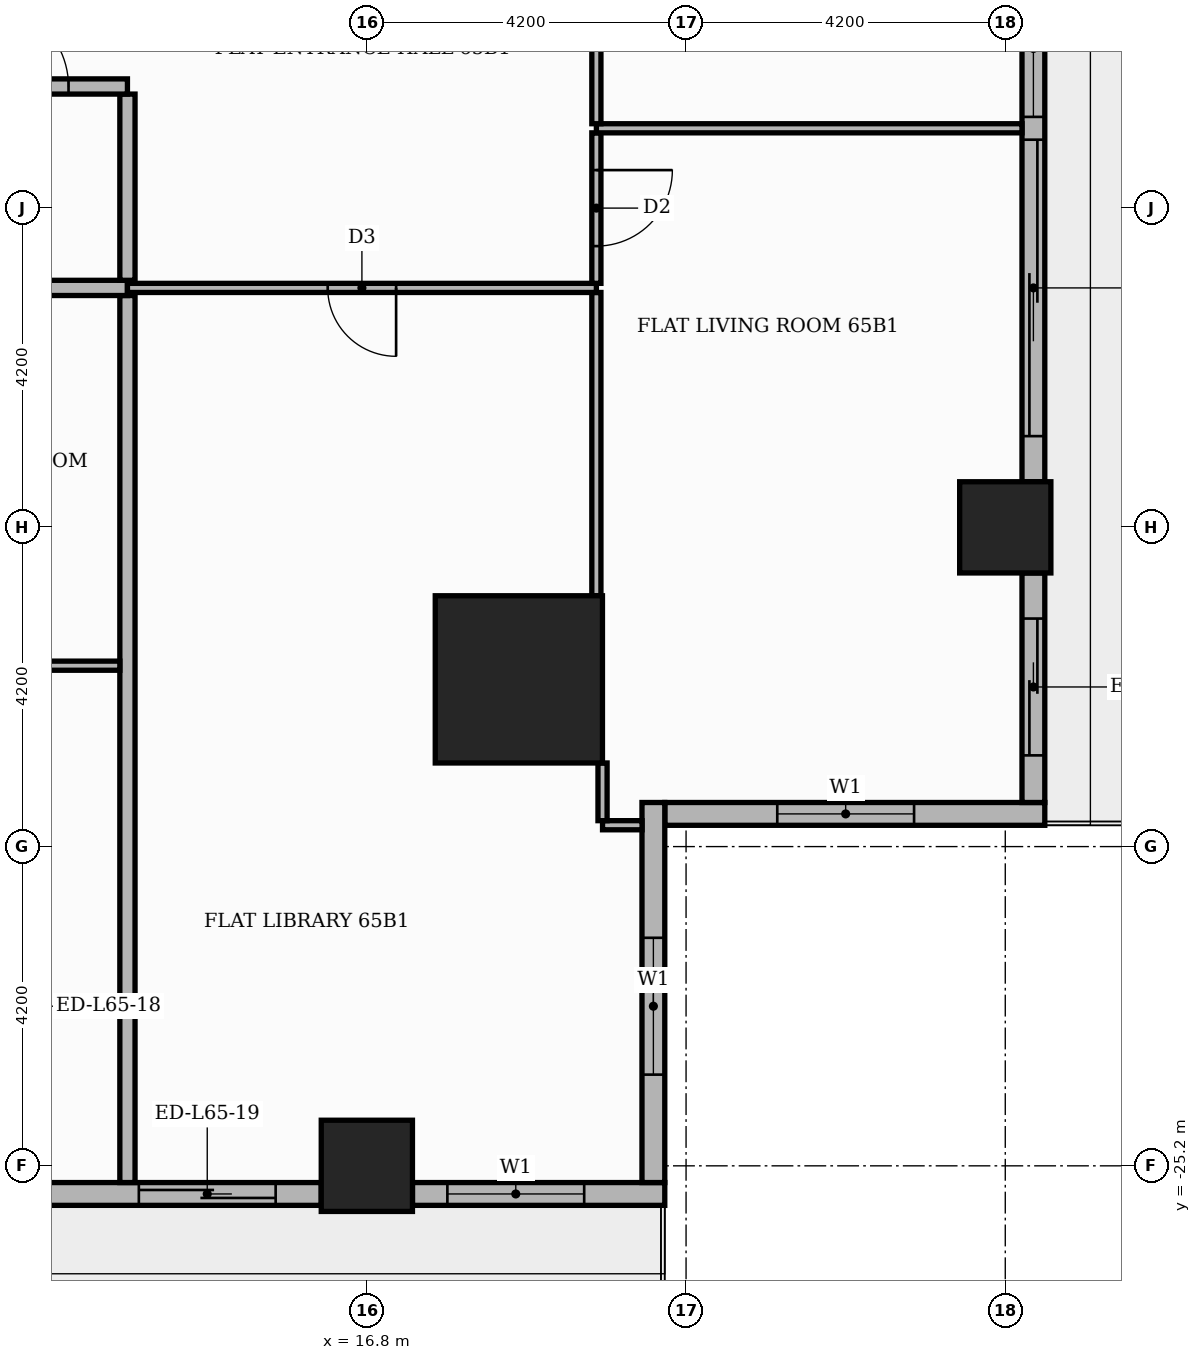
"""IFC4 building model, lengths in metres.
Left out: names, types, materials, properties, quantities, classifications, styles, units other than length and angle.
Written with IfcOpenShell. Run it as: python <this file> out.ifc"""

import sys

from ifc_helpers import new_model, si_unit, direction, frame, frame_2d, origin, origin_2d, place, context, subcontext, project, spatial, rectangle, extrude, element, fill, save


model = new_model("IFC4")
c1 = context("Model", 3, precision=1e-05, world=origin(), true_north=direction((0.0, 1.0)))
c2 = subcontext(c1, "Body", "Model", "MODEL_VIEW")
j1 = project(units=[si_unit("LENGTHUNIT", "METRE"), si_unit("PLANEANGLEUNIT", "RADIAN")], contexts=[c1])
p1 = place(None, origin())
s1 = spatial("IfcSite", under=j1, at=p1, CompositionType="ELEMENT")
p2 = place(p1, origin())
s2 = spatial("IfcBuilding", under=s1, at=p2, CompositionType="ELEMENT")
p3 = place(p2, frame((0.0, 0.0, 271.8)))
s3 = spatial("IfcBuildingStorey", under=s2, at=p3, CompositionType="ELEMENT", Elevation=271.8)
p4 = place(p3, frame((18.8, -18.8, 0.0), z_axis=(0.0, 0.0, 1.0), x_axis=(1.0, 0.0, 0.0)))
e1 = element("IfcColumn", 1, at=p4, inside=s3, PredefinedType="COLUMN", context=c2, shape_type="SweptSolid", body=[
    extrude(rectangle(XDim=2.2, YDim=2.2, at=origin_2d()), origin(), (0.0, 0.0, 1.0), 3.9),
])
for number, where, z_axis, x_axis in (
    (2, (25.2, -16.8, 0.0), (0.0, 0.0, 1.0), (1.0, 0.0, 0.0)),
    (3, (16.8, -25.2, 0.0), (0.0, 0.0, 1.0), (1.0, 0.0, 0.0)),
):
    element("IfcColumn", number, at=place(p3, frame(where, z_axis=z_axis, x_axis=x_axis)), inside=s3, PredefinedType="COLUMN", context=c2, shape_type="SweptSolid", body=[
        extrude(rectangle(XDim=1.2, YDim=1.2, at=origin_2d()), origin(), (0.0, 0.0, 1.0), 3.9),
    ])
p5 = place(p3, frame((20.72, -20.57, 0.0), z_axis=(0.0, 0.0, 1.0), x_axis=(1.0, 0.0, 0.0)))
e4 = element("IfcWall", 4, at=p5, inside=s3, PredefinedType="STANDARD", context=c2, shape_type="SweptSolid", body=[
    extrude(rectangle(XDim=5.0, YDim=0.3, at=frame_2d((2.5, 0.0))), origin(), (0.0, 0.0, 1.0), 3.48),
])
p6 = place(p5, frame((1.48, 0.0, 0.9)))
e5 = element("IfcOpeningElement", 5, at=p6, cuts=e4, PredefinedType="OPENING", context=c2, shape_type="SweptSolid", body=[
    extrude(rectangle(XDim=1.8, YDim=2.1, at=frame_2d((0.9, 1.05))), frame((0.0, 0.16, 0.0), z_axis=(0.0, -1.0, 0.0), x_axis=(1.0, 0.0, 0.0)), (0.0, 0.0, 1.0), 0.32),
])
p7 = place(p3, frame((25.57, -20.42, 0.0), z_axis=(0.0, 0.0, 1.0), x_axis=(0.0, 1.0, 0.0)))
e6 = element("IfcWall", 6, at=p7, inside=s3, PredefinedType="STANDARD", context=c2, shape_type="SweptSolid", body=[
    extrude(rectangle(XDim=3.02, YDim=0.3, at=frame_2d((1.51, 0.0))), origin(), (0.0, 0.0, 1.0), 3.48),
])
p8 = place(p7, frame((0.62, 0.0, 0.0)))
e7 = element("IfcOpeningElement", 7, at=p8, cuts=e6, PredefinedType="OPENING", context=c2, shape_type="SweptSolid", body=[
    extrude(rectangle(XDim=1.8, YDim=2.4, at=frame_2d((0.9, 1.2))), frame((0.0, 0.16, 0.0), z_axis=(0.0, -1.0, 0.0), x_axis=(1.0, 0.0, 0.0)), (0.0, 0.0, 1.0), 0.32),
])
p9 = place(p3, frame((25.57, -16.2, 0.0), z_axis=(0.0, 0.0, 1.0), x_axis=(0.0, 1.0, 0.0)))
e8 = element("IfcWall", 8, at=p9, inside=s3, PredefinedType="STANDARD", context=c2, shape_type="SweptSolid", body=[
    extrude(rectangle(XDim=7.2, YDim=0.3, at=frame_2d((3.6, 0.0))), origin(), (0.0, 0.0, 1.0), 3.48),
])
p10 = place(p9, frame((0.6, 0.0, 0.0)))
e9 = element("IfcOpeningElement", 9, at=p10, cuts=e8, PredefinedType="OPENING", context=c2, shape_type="SweptSolid", body=[
    extrude(rectangle(XDim=3.9, YDim=2.4, at=frame_2d((1.95, 1.2))), frame((0.0, 0.16, 0.0), z_axis=(0.0, -1.0, 0.0), x_axis=(1.0, 0.0, 0.0)), (0.0, 0.0, 1.0), 0.32),
])
p11 = place(p9, frame((4.8, 0.0, 0.9)))
e10 = element("IfcOpeningElement", 10, at=p11, cuts=e8, PredefinedType="OPENING", context=c2, shape_type="SweptSolid", body=[
    extrude(rectangle(XDim=1.8, YDim=2.1, at=frame_2d((0.9, 1.05))), frame((0.0, 0.16, 0.0), z_axis=(0.0, -1.0, 0.0), x_axis=(1.0, 0.0, 0.0)), (0.0, 0.0, 1.0), 0.32),
])
p12 = place(p3, frame((11.85, -25.57, 0.0), z_axis=(0.0, 0.0, 1.0), x_axis=(1.0, 0.0, 0.0)))
e11 = element("IfcWall", 11, at=p12, inside=s3, PredefinedType="STANDARD", context=c2, shape_type="SweptSolid", body=[
    extrude(rectangle(XDim=4.35, YDim=0.3, at=frame_2d((2.175, 0.0))), origin(), (0.0, 0.0, 1.0), 3.48),
])
p13 = place(p12, frame((1.95, 0.0, 0.0)))
e12 = element("IfcOpeningElement", 12, at=p13, cuts=e11, PredefinedType="OPENING", context=c2, shape_type="SweptSolid", body=[
    extrude(rectangle(XDim=1.8, YDim=2.4, at=frame_2d((0.9, 1.2))), frame((0.0, 0.16, 0.0), z_axis=(0.0, -1.0, 0.0), x_axis=(1.0, 0.0, 0.0)), (0.0, 0.0, 1.0), 0.32),
])
p14 = place(p3, frame((17.4, -25.57, 0.0), z_axis=(0.0, 0.0, 1.0), x_axis=(1.0, 0.0, 0.0)))
e13 = element("IfcWall", 13, at=p14, inside=s3, PredefinedType="STANDARD", context=c2, shape_type="SweptSolid", body=[
    extrude(rectangle(XDim=3.32, YDim=0.3, at=frame_2d((1.66, 0.0))), origin(), (0.0, 0.0, 1.0), 3.48),
])
p15 = place(p14, frame((0.459, 0.0, 0.9)))
e14 = element("IfcOpeningElement", 14, at=p15, cuts=e13, PredefinedType="OPENING", context=c2, shape_type="SweptSolid", body=[
    extrude(rectangle(XDim=1.8, YDim=2.1, at=frame_2d((0.9, 1.05))), frame((0.0, 0.16, 0.0), z_axis=(0.0, -1.0, 0.0), x_axis=(1.0, 0.0, 0.0)), (0.0, 0.0, 1.0), 0.32),
])
p16 = place(p3, frame((20.57, -25.42, 0.0), z_axis=(0.0, 0.0, 1.0), x_axis=(0.0, 1.0, 0.0)))
e15 = element("IfcWall", 15, at=p16, inside=s3, PredefinedType="STANDARD", context=c2, shape_type="SweptSolid", body=[
    extrude(rectangle(XDim=5.0, YDim=0.3, at=frame_2d((2.5, 0.0))), origin(), (0.0, 0.0, 1.0), 3.48),
])
p17 = place(p16, frame((1.42, 0.0, 0.9)))
e16 = element("IfcOpeningElement", 16, at=p17, cuts=e15, PredefinedType="OPENING", context=c2, shape_type="SweptSolid", body=[
    extrude(rectangle(XDim=1.8, YDim=2.1, at=frame_2d((0.9, 1.05))), frame((0.0, 0.16, 0.0), z_axis=(0.0, -1.0, 0.0), x_axis=(1.0, 0.0, 0.0)), (0.0, 0.0, 1.0), 0.32),
])
p18 = place(p3, frame((13.65, -25.42, 0.0), z_axis=(0.0, 0.0, 1.0), x_axis=(0.0, 1.0, 0.0)))
e17 = element("IfcWall", 17, at=p18, inside=s3, PredefinedType="PARTITIONING", context=c2, shape_type="SweptSolid", body=[
    extrude(rectangle(XDim=11.67, YDim=0.2, at=frame_2d((5.835, 0.0))), origin(), (0.0, 0.0, 1.0), 3.48),
])
p19 = place(p3, frame((19.901, -20.719, 0.0), z_axis=(0.0, 0.0, 1.0), x_axis=(1.0, 0.0, 0.0)))
e18 = element("IfcWall", 18, at=p19, inside=s3, PredefinedType="PARTITIONING", context=c2, shape_type="SweptSolid", body=[
    extrude(rectangle(XDim=0.52, YDim=0.12, at=frame_2d((0.26, 0.0))), origin(), (0.0, 0.0, 1.0), 3.48),
])
p20 = place(p3, frame((19.901, -20.659, 0.0), z_axis=(0.0, 0.0, 1.0), x_axis=(0.0, 1.0, 0.0)))
e19 = element("IfcWall", 19, at=p20, inside=s3, PredefinedType="PARTITIONING", context=c2, shape_type="SweptSolid", body=[
    extrude(rectangle(XDim=0.759, YDim=0.12, at=frame_2d((0.379, 0.0))), origin(), (0.0, 0.0, 1.0), 3.48),
])
p21 = place(p3, frame((-7.35, -18.62, 0.0), z_axis=(0.0, 0.0, 1.0), x_axis=(1.0, 0.0, 0.0)))
e20 = element("IfcWall", 20, at=p21, inside=s3, PredefinedType="PARTITIONING", context=c2, shape_type="SweptSolid", body=[
    extrude(rectangle(XDim=20.9, YDim=0.12, at=frame_2d((10.45, 0.0))), origin(), (0.0, 0.0, 1.0), 3.48),
])
p22 = place(p21, frame((2.7, 0.0, 0.0)))
e21 = element("IfcOpeningElement", 21, at=p22, cuts=e20, PredefinedType="OPENING", context=c2, shape_type="SweptSolid", body=[
    extrude(rectangle(XDim=0.9, YDim=2.1, at=frame_2d((0.45, 1.05))), frame((0.0, 0.07, 0.0), z_axis=(0.0, -1.0, 0.0), x_axis=(1.0, 0.0, 0.0)), (0.0, 0.0, 1.0), 0.14),
])
p23 = place(p21, frame((7.95, 0.0, 0.0)))
e22 = element("IfcOpeningElement", 22, at=p23, cuts=e20, PredefinedType="OPENING", context=c2, shape_type="SweptSolid", body=[
    extrude(rectangle(XDim=0.9, YDim=2.1, at=frame_2d((0.45, 1.05))), frame((0.0, 0.07, 0.0), z_axis=(0.0, -1.0, 0.0), x_axis=(1.0, 0.0, 0.0)), (0.0, 0.0, 1.0), 0.14),
])
p24 = place(p21, frame((11.1, 0.0, 0.0)))
e23 = element("IfcOpeningElement", 23, at=p24, cuts=e20, PredefinedType="OPENING", context=c2, shape_type="SweptSolid", body=[
    extrude(rectangle(XDim=0.9, YDim=2.1, at=frame_2d((0.45, 1.05))), frame((0.0, 0.07, 0.0), z_axis=(0.0, -1.0, 0.0), x_axis=(1.0, 0.0, 0.0)), (0.0, 0.0, 1.0), 0.14),
])
p25 = place(p21, frame((13.275, 0.0, 0.0)))
e24 = element("IfcOpeningElement", 24, at=p25, cuts=e20, PredefinedType="OPENING", context=c2, shape_type="SweptSolid", body=[
    extrude(rectangle(XDim=0.9, YDim=2.1, at=frame_2d((0.45, 1.05))), frame((0.0, 0.07, 0.0), z_axis=(0.0, -1.0, 0.0), x_axis=(1.0, 0.0, 0.0)), (0.0, 0.0, 1.0), 0.14),
])
p26 = place(p21, frame((15.375, 0.0, 0.0)))
e25 = element("IfcOpeningElement", 25, at=p26, cuts=e20, PredefinedType="OPENING", context=c2, shape_type="SweptSolid", body=[
    extrude(rectangle(XDim=0.9, YDim=2.1, at=frame_2d((0.45, 1.05))), frame((0.0, 0.07, 0.0), z_axis=(0.0, -1.0, 0.0), x_axis=(1.0, 0.0, 0.0)), (0.0, 0.0, 1.0), 0.14),
])
p27 = place(p21, frame((18.45, 0.0, 0.0)))
e26 = element("IfcOpeningElement", 26, at=p27, cuts=e20, PredefinedType="OPENING", context=c2, shape_type="SweptSolid", body=[
    extrude(rectangle(XDim=0.9, YDim=2.1, at=frame_2d((0.45, 1.05))), frame((0.0, 0.07, 0.0), z_axis=(0.0, -1.0, 0.0), x_axis=(1.0, 0.0, 0.0)), (0.0, 0.0, 1.0), 0.14),
])
p28 = place(p3, frame((19.82, -17.7, 0.0), z_axis=(0.0, 0.0, 1.0), x_axis=(0.0, 1.0, 0.0)))
e27 = element("IfcWall", 27, at=p28, inside=s3, PredefinedType="PARTITIONING", context=c2, shape_type="SweptSolid", body=[
    extrude(rectangle(XDim=3.99, YDim=0.12, at=frame_2d((1.995, 0.0))), origin(), (0.0, 0.0, 1.0), 3.48),
])
p29 = place(p3, frame((-25.42, -13.65, 0.0), z_axis=(0.0, 0.0, 1.0), x_axis=(1.0, 0.0, 0.0)))
e28 = element("IfcWall", 28, at=p29, inside=s3, PredefinedType="PARTITIONING", context=c2, shape_type="SweptSolid", body=[
    extrude(rectangle(XDim=39.07, YDim=0.2, at=frame_2d((19.535, 0.0))), origin(), (0.0, 0.0, 1.0), 3.48),
])
p30 = place(p29, frame((14.37, 0.0, 0.0)))
e29 = element("IfcOpeningElement", 29, at=p30, cuts=e28, PredefinedType="OPENING", context=c2, shape_type="SweptSolid", body=[
    extrude(rectangle(XDim=1.1, YDim=2.4, at=frame_2d((0.55, 1.2))), frame((0.0, 0.11, 0.0), z_axis=(0.0, -1.0, 0.0), x_axis=(1.0, 0.0, 0.0)), (0.0, 0.0, 1.0), 0.22),
])
p31 = place(p3, frame((13.65, -13.65, 0.0), z_axis=(0.0, 0.0, 1.0), x_axis=(1.0, 0.0, 0.0)))
e30 = element("IfcWall", 30, at=p31, inside=s3, PredefinedType="PARTITIONING", context=c2, shape_type="SweptSolid", body=[
    extrude(rectangle(XDim=6.17, YDim=0.12, at=frame_2d((3.085, 0.0))), origin(), (0.0, 0.0, 1.0), 3.48),
])
p32 = place(p31, frame((2.635, 0.0, 0.0)))
e31 = element("IfcOpeningElement", 31, at=p32, cuts=e30, PredefinedType="OPENING", context=c2, shape_type="SweptSolid", body=[
    extrude(rectangle(XDim=0.9, YDim=2.1, at=frame_2d((0.45, 1.05))), frame((0.0, 0.07, 0.0), z_axis=(0.0, -1.0, 0.0), x_axis=(1.0, 0.0, 0.0)), (0.0, 0.0, 1.0), 0.14),
])
p33 = place(p3, frame((19.82, -13.59, 0.0), z_axis=(0.0, 0.0, 1.0), x_axis=(0.0, 1.0, 0.0)))
e32 = element("IfcWall", 32, at=p33, inside=s3, PredefinedType="PARTITIONING", context=c2, shape_type="SweptSolid", body=[
    extrude(rectangle(XDim=1.98, YDim=0.12, at=frame_2d((0.99, 0.0))), origin(), (0.0, 0.0, 1.0), 3.48),
])
p34 = place(p33, frame((0.49, 0.0, 0.0)))
e33 = element("IfcOpeningElement", 33, at=p34, cuts=e32, PredefinedType="OPENING", context=c2, shape_type="SweptSolid", body=[
    extrude(rectangle(XDim=1.0, YDim=2.1, at=frame_2d((0.5, 1.05))), frame((0.0, 0.07, 0.0), z_axis=(0.0, -1.0, 0.0), x_axis=(1.0, 0.0, 0.0)), (0.0, 0.0, 1.0), 0.14),
])
p35 = place(p3, frame((13.65, -13.55, 0.0), z_axis=(0.0, 0.0, 1.0), x_axis=(0.0, 1.0, 0.0)))
e34 = element("IfcWall", 34, at=p35, inside=s3, PredefinedType="PARTITIONING", context=c2, shape_type="SweptSolid", body=[
    extrude(rectangle(XDim=2.45, YDim=0.2, at=frame_2d((1.225, 0.0))), origin(), (0.0, 0.0, 1.0), 3.48),
])
p36 = place(p3, frame((19.82, -11.55, 0.0), z_axis=(0.0, 0.0, 1.0), x_axis=(1.0, 0.0, 0.0)))
e35 = element("IfcWall", 35, at=p36, inside=s3, PredefinedType="PARTITIONING", context=c2, shape_type="SweptSolid", body=[
    extrude(rectangle(XDim=5.6, YDim=0.12, at=frame_2d((2.8, 0.0))), origin(), (0.0, 0.0, 1.0), 3.48),
])
p37 = place(p3, frame((19.82, -11.49, 0.0), z_axis=(0.0, 0.0, 1.0), x_axis=(0.0, 1.0, 0.0)))
e36 = element("IfcWall", 36, at=p37, inside=s3, PredefinedType="PARTITIONING", context=c2, shape_type="SweptSolid", body=[
    extrude(rectangle(XDim=8.28, YDim=0.12, at=frame_2d((4.14, 0.0))), origin(), (0.0, 0.0, 1.0), 3.48),
])
p38 = place(p37, frame((3.64, 0.0, 0.0)))
e37 = element("IfcOpeningElement", 37, at=p38, cuts=e36, PredefinedType="OPENING", context=c2, shape_type="SweptSolid", body=[
    extrude(rectangle(XDim=1.0, YDim=2.1, at=frame_2d((0.5, 1.05))), frame((0.0, 0.07, 0.0), z_axis=(0.0, -1.0, 0.0), x_axis=(1.0, 0.0, 0.0)), (0.0, 0.0, 1.0), 0.14),
])
p39 = place(p3, frame((11.0, -11.0, 0.0), z_axis=(0.0, 0.0, 1.0), x_axis=(1.0, 0.0, 0.0)))
e38 = element("IfcWall", 38, at=p39, inside=s3, PredefinedType="PARTITIONING", context=c2, shape_type="SweptSolid", body=[
    extrude(rectangle(XDim=2.65, YDim=0.2, at=frame_2d((1.325, 0.0))), origin(), (0.0, 0.0, 1.0), 3.48),
])
p40 = place(p39, frame((0.775, 0.0, 0.0)))
e39 = element("IfcOpeningElement", 39, at=p40, cuts=e38, PredefinedType="OPENING", context=c2, shape_type="SweptSolid", body=[
    extrude(rectangle(XDim=1.1, YDim=2.4, at=frame_2d((0.55, 1.2))), frame((0.0, 0.11, 0.0), z_axis=(0.0, -1.0, 0.0), x_axis=(1.0, 0.0, 0.0)), (0.0, 0.0, 1.0), 0.22),
])
p41 = place(p6, origin())
e40 = element("IfcWindow", 40, at=p41, inside=s3, PartitioningType="SINGLE_PANEL", PredefinedType="WINDOW", context=c2, shape_type="SweptSolid", body=[
    extrude(rectangle(XDim=1.8, YDim=2.1, at=frame_2d((0.9, 1.05))), frame((0.0, 0.03, 0.0), z_axis=(0.0, -1.0, 0.0), x_axis=(1.0, 0.0, 0.0)), (0.0, 0.0, 1.0), 0.06),
])
fill(e5, e40)
p42 = place(p8, origin())
e41 = element("IfcDoor", 41, at=p42, inside=s3, OperationType="SLIDING_TO_RIGHT", PredefinedType="DOOR", context=c2, shape_type="SweptSolid", body=[
    extrude(rectangle(XDim=1.8, YDim=2.4, at=frame_2d((0.9, 1.2))), frame((0.0, 0.025, 0.0), z_axis=(0.0, -1.0, 0.0), x_axis=(1.0, 0.0, 0.0)), (0.0, 0.0, 1.0), 0.05),
])
fill(e7, e41)
p43 = place(p10, origin())
e42 = element("IfcDoor", 42, at=p43, inside=s3, OperationType="SLIDING_TO_LEFT", PredefinedType="DOOR", context=c2, shape_type="SweptSolid", body=[
    extrude(rectangle(XDim=3.9, YDim=2.4, at=frame_2d((1.95, 1.2))), frame((0.0, 0.025, 0.0), z_axis=(0.0, -1.0, 0.0), x_axis=(1.0, 0.0, 0.0)), (0.0, 0.0, 1.0), 0.05),
])
fill(e9, e42)
p44 = place(p11, origin())
e43 = element("IfcWindow", 43, at=p44, inside=s3, PartitioningType="SINGLE_PANEL", PredefinedType="WINDOW", context=c2, shape_type="SweptSolid", body=[
    extrude(rectangle(XDim=1.8, YDim=2.1, at=frame_2d((0.9, 1.05))), frame((0.0, 0.03, 0.0), z_axis=(0.0, -1.0, 0.0), x_axis=(1.0, 0.0, 0.0)), (0.0, 0.0, 1.0), 0.06),
])
fill(e10, e43)
p45 = place(p13, origin())
e44 = element("IfcDoor", 44, at=p45, inside=s3, OperationType="SLIDING_TO_RIGHT", PredefinedType="DOOR", context=c2, shape_type="SweptSolid", body=[
    extrude(rectangle(XDim=1.8, YDim=2.4, at=frame_2d((0.9, 1.2))), frame((0.0, 0.025, 0.0), z_axis=(0.0, -1.0, 0.0), x_axis=(1.0, 0.0, 0.0)), (0.0, 0.0, 1.0), 0.05),
])
fill(e12, e44)
p46 = place(p15, origin())
e45 = element("IfcWindow", 45, at=p46, inside=s3, PartitioningType="SINGLE_PANEL", PredefinedType="WINDOW", context=c2, shape_type="SweptSolid", body=[
    extrude(rectangle(XDim=1.8, YDim=2.1, at=frame_2d((0.9, 1.05))), frame((0.0, 0.03, 0.0), z_axis=(0.0, -1.0, 0.0), x_axis=(1.0, 0.0, 0.0)), (0.0, 0.0, 1.0), 0.06),
])
fill(e14, e45)
p47 = place(p17, origin())
e46 = element("IfcWindow", 46, at=p47, inside=s3, PartitioningType="SINGLE_PANEL", PredefinedType="WINDOW", context=c2, shape_type="SweptSolid", body=[
    extrude(rectangle(XDim=1.8, YDim=2.1, at=frame_2d((0.9, 1.05))), frame((0.0, 0.03, 0.0), z_axis=(0.0, -1.0, 0.0), x_axis=(1.0, 0.0, 0.0)), (0.0, 0.0, 1.0), 0.06),
])
fill(e16, e46)
p48 = place(p40, origin())
e47 = element("IfcDoor", 47, at=p48, inside=s3, OperationType="SINGLE_SWING_LEFT", PredefinedType="DOOR", context=c2, shape_type="SweptSolid", body=[
    extrude(rectangle(XDim=1.1, YDim=2.4, at=frame_2d((0.55, 1.2))), frame((0.0, 0.025, 0.0), z_axis=(0.0, -1.0, 0.0), x_axis=(1.0, 0.0, 0.0)), (0.0, 0.0, 1.0), 0.05),
])
fill(e39, e47)
p49 = place(p32, frame((0.9, 0.0, 0.0), z_axis=(0.0, 0.0, 1.0), x_axis=(-1.0, 0.0, 0.0)))
e48 = element("IfcDoor", 48, at=p49, inside=s3, OperationType="SINGLE_SWING_RIGHT", PredefinedType="DOOR", context=c2, shape_type="SweptSolid", body=[
    extrude(rectangle(XDim=0.9, YDim=2.1, at=frame_2d((0.45, 1.05))), frame((0.0, 0.025, 0.0), z_axis=(0.0, -1.0, 0.0), x_axis=(1.0, 0.0, 0.0)), (0.0, 0.0, 1.0), 0.05),
])
fill(e31, e48)
p50 = place(p34, frame((1.0, 0.0, 0.0), z_axis=(0.0, 0.0, 1.0), x_axis=(-1.0, 0.0, 0.0)))
e49 = element("IfcDoor", 49, at=p50, inside=s3, OperationType="SINGLE_SWING_RIGHT", PredefinedType="DOOR", context=c2, shape_type="SweptSolid", body=[
    extrude(rectangle(XDim=1.0, YDim=2.1, at=frame_2d((0.5, 1.05))), frame((0.0, 0.025, 0.0), z_axis=(0.0, -1.0, 0.0), x_axis=(1.0, 0.0, 0.0)), (0.0, 0.0, 1.0), 0.05),
])
fill(e33, e49)
save(model, sys.argv[1])
